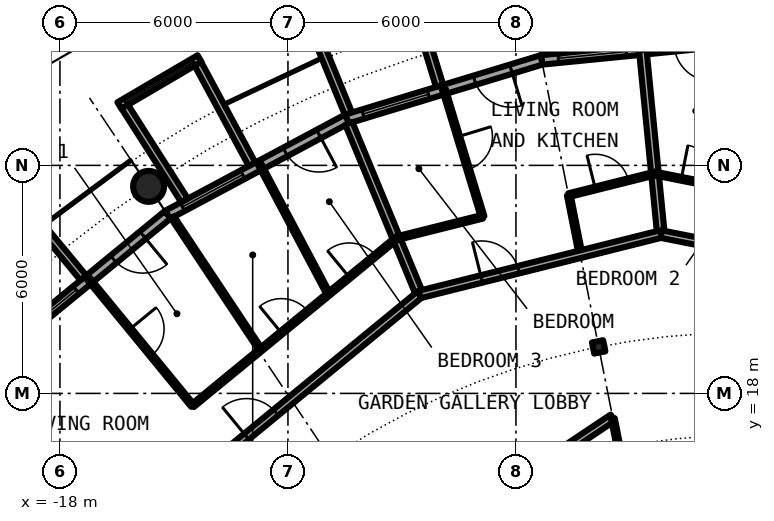
"""IFC4 building model, lengths in metres.
Left out: names, types, materials, properties, quantities, classifications, styles, units other than length and angle.
Written with IfcOpenShell. Run it as: python <this file> out.ifc"""

import sys

from ifc_helpers import new_model, si_unit, direction, frame, frame_2d, origin, origin_2d, place, context, subcontext, project, spatial, rectangle, circle, hollow_circle, i_section, extrude, element, fill, save


model = new_model("IFC4")
c1 = context("Model", 3, precision=1e-05, world=origin(), true_north=direction((0.0, 1.0)))
c2 = subcontext(c1, "Body", "Model", "MODEL_VIEW")
j1 = project(units=[si_unit("LENGTHUNIT", "METRE"), si_unit("PLANEANGLEUNIT", "RADIAN")], contexts=[c1])
p1 = place(None, origin())
s1 = spatial("IfcSite", under=j1, at=p1, CompositionType="ELEMENT")
p2 = place(p1, origin())
s2 = spatial("IfcBuilding", under=s1, at=p2, CompositionType="ELEMENT")
p3 = place(p2, frame((0.0, 0.0, 227.95)))
s3 = spatial("IfcBuildingStorey", under=s2, at=p3, CompositionType="ELEMENT", Elevation=227.95)
p4 = place(p3, frame((-15.667, 23.448, 0.0), z_axis=(0.0, 0.0, 1.0), x_axis=(1.0, 0.0, 0.0)))
e1 = element("IfcColumn", 1, at=p4, inside=s3, PredefinedType="COLUMN", context=c2, shape_type="SweptSolid", body=[
    extrude(hollow_circle(Radius=0.406, WallThickness=0.03, at=origin_2d()), origin(), (0.0, 0.0, 1.0), 3.05),
])
p5 = place(p3, frame((-3.824, 19.223, 0.0), z_axis=(0.0, 0.0, 1.0), x_axis=(-0.195090322016, 0.980785280403, 0.0)))
e2 = element("IfcColumn", 2, at=p5, inside=s3, PredefinedType="COLUMN", context=c2, shape_type="SweptSolid", body=[
    extrude(i_section(OverallWidth=0.3, OverallDepth=0.3, WebThickness=0.011, FlangeThickness=0.019, FilletRadius=0.027, at=origin_2d()), origin(), (0.0, 0.0, 1.0), 3.05),
])
p6 = place(p3, frame((0.0, 27.3, 0.0), z_axis=(0.0, 0.0, 1.0), x_axis=(-0.995173996315, -0.098126026407, 0.0)))
e3 = element("IfcWall", 3, at=p6, inside=s3, PredefinedType="SOLIDWALL", context=c2, shape_type="SweptSolid", body=[
    extrude(rectangle(XDim=5.352, YDim=0.25, at=frame_2d((2.676, 0.0))), origin(), (0.0, 0.0, 1.0), 2.7),
])
p7 = place(p6, frame((0.841, 0.0, 0.0)))
e4 = element("IfcOpeningElement", 4, at=p7, cuts=e3, PredefinedType="OPENING", context=c2, shape_type="SweptSolid", body=[
    extrude(rectangle(XDim=1.0, YDim=2.2, at=frame_2d((0.5, 1.1))), frame((0.0, 0.135, 0.0), z_axis=(0.0, -1.0, 0.0), x_axis=(1.0, 0.0, 0.0)), (0.0, 0.0, 1.0), 0.27),
])
p8 = place(p6, frame((3.111, 0.0, 0.3)))
e5 = element("IfcOpeningElement", 5, at=p8, cuts=e3, PredefinedType="OPENING", context=c2, shape_type="SweptSolid", body=[
    extrude(rectangle(XDim=1.8, YDim=2.1, at=frame_2d((0.9, 1.05))), frame((0.0, 0.135, 0.0), z_axis=(0.0, -1.0, 0.0), x_axis=(1.0, 0.0, 0.0)), (0.0, 0.0, 1.0), 0.27),
])
p9 = place(p3, frame((-4.769, 26.956, -0.03), z_axis=(0.0, 0.0, 1.0), x_axis=(-0.174056778901, 0.984735618183, 0.0)))
e6 = element("IfcWall", 6, at=p9, inside=s3, PredefinedType="SOLIDWALL", context=c2, shape_type="SweptSolid", body=[
    extrude(rectangle(XDim=2.925, YDim=0.2, at=frame_2d((1.462, 0.0))), origin(), (0.0, 0.0, 1.0), 2.73),
])
p10 = place(p3, frame((-5.326, 26.775, 0.0), z_axis=(0.0, 0.0, 1.0), x_axis=(-0.956965678721, -0.290201119486, 0.0)))
e7 = element("IfcWall", 7, at=p10, inside=s3, PredefinedType="SOLIDWALL", context=c2, shape_type="SweptSolid", body=[
    extrude(rectangle(XDim=5.351, YDim=0.25, at=frame_2d((2.676, 0.0))), origin(), (0.0, 0.0, 1.0), 2.7),
])
p11 = place(p10, frame((0.841, 0.0, 0.0)))
e8 = element("IfcOpeningElement", 8, at=p11, cuts=e7, PredefinedType="OPENING", context=c2, shape_type="SweptSolid", body=[
    extrude(rectangle(XDim=1.0, YDim=2.2, at=frame_2d((0.5, 1.1))), frame((0.0, 0.135, 0.0), z_axis=(0.0, -1.0, 0.0), x_axis=(1.0, 0.0, 0.0)), (0.0, 0.0, 1.0), 0.27),
])
p12 = place(p10, frame((3.111, 0.0, 0.3)))
e9 = element("IfcOpeningElement", 9, at=p12, cuts=e7, PredefinedType="OPENING", context=c2, shape_type="SweptSolid", body=[
    extrude(rectangle(XDim=1.8, YDim=2.1, at=frame_2d((0.9, 1.05))), frame((0.0, 0.135, 0.0), z_axis=(0.0, -1.0, 0.0), x_axis=(1.0, 0.0, 0.0)), (0.0, 0.0, 1.0), 0.27),
])
p13 = place(p3, frame((-8.009, 26.092, -0.03), z_axis=(0.0, 0.0, 1.0), x_axis=(-0.293406695073, 0.955987715029, 0.0)))
e10 = element("IfcWall", 10, at=p13, inside=s3, PredefinedType="SOLIDWALL", context=c2, shape_type="SweptSolid", body=[
    extrude(rectangle(XDim=3.006, YDim=0.2, at=frame_2d((1.503, 0.0))), origin(), (0.0, 0.0, 1.0), 2.73),
])
p14 = place(p3, frame((-10.409, 25.364, -0.03), z_axis=(0.0, 0.0, 1.0), x_axis=(-0.379509886562, 0.925187681501, 0.0)))
e11 = element("IfcWall", 11, at=p14, inside=s3, PredefinedType="SOLIDWALL", context=c2, shape_type="SweptSolid", body=[
    extrude(rectangle(XDim=2.883, YDim=0.2, at=frame_2d((1.441, 0.0))), origin(), (0.0, 0.0, 1.0), 2.73),
])
p15 = place(p3, frame((-10.447, 25.222, 0.0), z_axis=(0.0, 0.0, 1.0), x_axis=(-0.881915646801, -0.471407246368, 0.0)))
e12 = element("IfcWall", 12, at=p15, inside=s3, PredefinedType="SOLIDWALL", context=c2, shape_type="SweptSolid", body=[
    extrude(rectangle(XDim=5.352, YDim=0.25, at=frame_2d((2.676, 0.0))), origin(), (0.0, 0.0, 1.0), 2.7),
])
p16 = place(p15, frame((0.841, 0.0, 0.0)))
e13 = element("IfcOpeningElement", 13, at=p16, cuts=e12, PredefinedType="OPENING", context=c2, shape_type="SweptSolid", body=[
    extrude(rectangle(XDim=1.0, YDim=2.2, at=frame_2d((0.5, 1.1))), frame((0.0, 0.135, 0.0), z_axis=(0.0, -1.0, 0.0), x_axis=(1.0, 0.0, 0.0)), (0.0, 0.0, 1.0), 0.27),
])
p17 = place(p15, frame((3.111, 0.0, 0.3)))
e14 = element("IfcOpeningElement", 14, at=p17, cuts=e12, PredefinedType="OPENING", context=c2, shape_type="SweptSolid", body=[
    extrude(rectangle(XDim=1.8, YDim=2.1, at=frame_2d((0.9, 1.05))), frame((0.0, 0.135, 0.0), z_axis=(0.0, -1.0, 0.0), x_axis=(1.0, 0.0, 0.0)), (0.0, 0.0, 1.0), 0.27),
])
p18 = place(p3, frame((-14.327, 26.812, -0.03), z_axis=(0.0, 0.0, 1.0), x_axis=(-0.862403467503, -0.506221551535, 0.0)))
e15 = element("IfcWall", 15, at=p18, inside=s3, PredefinedType="SOLIDWALL", context=c2, shape_type="SweptSolid", body=[
    extrude(rectangle(XDim=2.446, YDim=0.2, at=frame_2d((1.223, 0.0))), origin(), (0.0, 0.0, 1.0), 2.73),
])
p19 = place(p18, frame((0.183, 0.0, 0.33)))
e16 = element("IfcOpeningElement", 16, at=p19, cuts=e15, PredefinedType="OPENING", context=c2, shape_type="SweptSolid", body=[
    extrude(circle(Radius=1.04, at=frame_2d((1.04, 1.04))), frame((0.0, 0.11, 0.0), z_axis=(0.0, -1.0, 0.0), x_axis=(1.0, 0.0, 0.0)), (0.0, 0.0, 1.0), 0.22),
])
p20 = place(p3, frame((-12.945, 24.029, -0.03), z_axis=(0.0, 0.0, 1.0), x_axis=(-0.474424310775, 0.88029629861, 0.0)))
e17 = element("IfcWall", 17, at=p20, inside=s3, PredefinedType="SOLIDWALL", context=c2, shape_type="SweptSolid", body=[
    extrude(rectangle(XDim=3.006, YDim=0.2, at=frame_2d((1.503, 0.0))), origin(), (0.0, 0.0, 1.0), 2.73),
])
p21 = place(p3, frame((-14.722, 23.079, -0.03), z_axis=(0.0, 0.0, 1.0), x_axis=(-0.537572179146, 0.843217737129, 0.0)))
e18 = element("IfcWall", 18, at=p21, inside=s3, PredefinedType="SOLIDWALL", context=c2, shape_type="SweptSolid", body=[
    extrude(rectangle(XDim=2.924, YDim=0.2, at=frame_2d((1.462, 0.0))), origin(), (0.0, 0.0, 1.0), 2.73),
])
p22 = place(p3, frame((-15.167, 22.699, 0.0), z_axis=(0.0, 0.0, 1.0), x_axis=(-0.773019449054, -0.634382322723, 0.0)))
e19 = element("IfcWall", 19, at=p22, inside=s3, PredefinedType="SOLIDWALL", context=c2, shape_type="SweptSolid", body=[
    extrude(rectangle(XDim=5.352, YDim=0.25, at=frame_2d((2.676, 0.0))), origin(), (0.0, 0.0, 1.0), 2.7),
])
p23 = place(p22, frame((0.841, 0.0, 0.0)))
e20 = element("IfcOpeningElement", 20, at=p23, cuts=e19, PredefinedType="OPENING", context=c2, shape_type="SweptSolid", body=[
    extrude(rectangle(XDim=1.0, YDim=2.2, at=frame_2d((0.5, 1.1))), frame((0.0, 0.135, 0.0), z_axis=(0.0, -1.0, 0.0), x_axis=(1.0, 0.0, 0.0)), (0.0, 0.0, 1.0), 0.27),
])
p24 = place(p22, frame((3.111, 0.0, 0.3)))
e21 = element("IfcOpeningElement", 21, at=p24, cuts=e19, PredefinedType="OPENING", context=c2, shape_type="SweptSolid", body=[
    extrude(rectangle(XDim=1.8, YDim=2.1, at=frame_2d((0.9, 1.05))), frame((0.0, 0.135, 0.0), z_axis=(0.0, -1.0, 0.0), x_axis=(1.0, 0.0, 0.0)), (0.0, 0.0, 1.0), 0.27),
])
p25 = place(p3, frame((-17.384, 21.041, -0.03), z_axis=(0.0, 0.0, 1.0), x_axis=(-0.63709551667, 0.770784861449, 0.0)))
e22 = element("IfcWall", 22, at=p25, inside=s3, PredefinedType="SOLIDWALL", context=c2, shape_type="SweptSolid", body=[
    extrude(rectangle(XDim=3.006, YDim=0.2, at=frame_2d((1.503, 0.0))), origin(), (0.0, 0.0, 1.0), 2.73),
])
p26 = place(p3, frame((-4.61, 23.217, 0.0), z_axis=(0.0, 0.0, 1.0), x_axis=(0.194485862594, -0.980905321247, 0.0)))
e23 = element("IfcWall", 23, at=p26, inside=s3, PredefinedType="PARTITIONING", context=c2, shape_type="SweptSolid", body=[
    extrude(rectangle(XDim=1.584, YDim=0.1, at=frame_2d((0.792, 0.0))), origin(), (0.0, 0.0, 1.0), 2.7),
])
p27 = place(p3, frame((-17.24, 21.007, 0.0), z_axis=(0.0, 0.0, 1.0), x_axis=(0.634342681687, -0.77305197897, 0.0)))
e24 = element("IfcWall", 24, at=p27, inside=s3, PredefinedType="PARTITIONING", context=c2, shape_type="SweptSolid", body=[
    extrude(rectangle(XDim=4.305, YDim=0.1, at=frame_2d((2.153, 0.0))), origin(), (0.0, 0.0, 1.0), 2.7),
])
p28 = place(p27, frame((1.703, 0.0, 0.0)))
e25 = element("IfcOpeningElement", 25, at=p28, cuts=e24, PredefinedType="OPENING", context=c2, shape_type="SweptSolid", body=[
    extrude(rectangle(XDim=0.9, YDim=2.3, at=frame_2d((0.45, 1.15))), frame((0.0, 0.06, 0.0), z_axis=(0.0, -1.0, 0.0), x_axis=(1.0, 0.0, 0.0)), (0.0, 0.0, 1.0), 0.12),
])
p29 = place(p3, frame((-12.734, 24.007, 0.0), z_axis=(0.0, 0.0, 1.0), x_axis=(0.468594334564, -0.883413464701, 0.0)))
e26 = element("IfcWall", 26, at=p29, inside=s3, PredefinedType="PARTITIONING", context=c2, shape_type="SweptSolid", body=[
    extrude(rectangle(XDim=3.841, YDim=0.1, at=frame_2d((1.92, 0.0))), origin(), (0.0, 0.0, 1.0), 2.7),
])
p30 = place(p3, frame((-10.399, 25.106, 0.0), z_axis=(0.0, 0.0, 1.0), x_axis=(0.382651153718, -0.923892902104, 0.0)))
e27 = element("IfcWall", 27, at=p30, inside=s3, PredefinedType="PARTITIONING", context=c2, shape_type="SweptSolid", body=[
    extrude(rectangle(XDim=4.874, YDim=0.2, at=frame_2d((2.437, 0.0))), origin(), (0.0, 0.0, 1.0), 2.7),
])
p31 = place(p3, frame((-7.897, 26.002, 0.0), z_axis=(0.0, 0.0, 1.0), x_axis=(0.290784578865, -0.956788549625, 0.0)))
e28 = element("IfcWall", 28, at=p31, inside=s3, PredefinedType="PARTITIONING", context=c2, shape_type="SweptSolid", body=[
    extrude(rectangle(XDim=3.504, YDim=0.1, at=frame_2d((1.752, 0.0))), origin(), (0.0, 0.0, 1.0), 2.7),
])
p32 = place(p31, frame((1.302, 0.0, 0.0)))
e29 = element("IfcOpeningElement", 29, at=p32, cuts=e28, PredefinedType="OPENING", context=c2, shape_type="SweptSolid", body=[
    extrude(rectangle(XDim=0.9, YDim=2.3, at=frame_2d((0.45, 1.15))), frame((0.0, 0.06, 0.0), z_axis=(0.0, -1.0, 0.0), x_axis=(1.0, 0.0, 0.0)), (0.0, 0.0, 1.0), 0.12),
])
p33 = place(p3, frame((-2.664, 27.044, 0.0), z_axis=(0.0, 0.0, 1.0), x_axis=(0.098070432075, -0.995179476453, 0.0)))
e30 = element("IfcWall", 30, at=p33, inside=s3, PredefinedType="PARTITIONING", context=c2, shape_type="SweptSolid", body=[
    extrude(rectangle(XDim=4.874, YDim=0.2, at=frame_2d((2.437, 0.0))), origin(), (0.0, 0.0, 1.0), 2.7),
])
p34 = place(p3, frame((-15.039, 22.634, 0.0), z_axis=(0.0, 0.0, 1.0), x_axis=(0.553609857728, -0.832776155654, 0.0)))
e31 = element("IfcWall", 31, at=p34, inside=s3, PredefinedType="PARTITIONING", context=c2, shape_type="SweptSolid", body=[
    extrude(rectangle(XDim=4.187, YDim=0.1, at=frame_2d((2.094, 0.0))), origin(), (0.0, 0.0, 1.0), 2.7),
])
p35 = place(p3, frame((-14.718, 9.832, 0.0), z_axis=(0.0, 0.0, 1.0), x_axis=(0.831437137577, 0.555618831806, 0.0)))
e32 = element("IfcWall", 32, at=p35, inside=s3, PredefinedType="PARTITIONING", context=c2, shape_type="SweptSolid", body=[
    extrude(rectangle(XDim=13.549, YDim=0.2, at=frame_2d((6.774, 0.0))), origin(), (0.0, 0.0, 1.0), 2.7),
])
p36 = place(p35, frame((7.968, 0.0, 0.0)))
e33 = element("IfcOpeningElement", 33, at=p36, cuts=e32, PredefinedType="OPENING", context=c2, shape_type="SweptSolid", body=[
    extrude(rectangle(XDim=1.0, YDim=2.3, at=frame_2d((0.5, 1.15))), frame((0.0, 0.11, 0.0), z_axis=(0.0, -1.0, 0.0), x_axis=(1.0, 0.0, 0.0)), (0.0, 0.0, 1.0), 0.22),
])
p37 = place(p3, frame((-18.542, 12.389, 0.0), z_axis=(0.0, 0.0, 1.0), x_axis=(0.772983503654, 0.634426121056, 0.0)))
e34 = element("IfcWall", 34, at=p37, inside=s3, PredefinedType="PARTITIONING", context=c2, shape_type="SweptSolid", body=[
    extrude(rectangle(XDim=12.947, YDim=0.2, at=frame_2d((6.474, 0.0))), origin(), (0.0, 0.0, 1.0), 2.7),
])
p38 = place(p37, frame((7.053, 0.0, 0.0)))
e35 = element("IfcOpeningElement", 35, at=p38, cuts=e34, PredefinedType="OPENING", context=c2, shape_type="SweptSolid", body=[
    extrude(rectangle(XDim=1.0, YDim=2.3, at=frame_2d((0.5, 1.15))), frame((0.0, 0.11, 0.0), z_axis=(0.0, -1.0, 0.0), x_axis=(1.0, 0.0, 0.0)), (0.0, 0.0, 1.0), 0.22),
])
p39 = place(p3, frame((-2.186, 22.193, 0.0), z_axis=(0.0, 0.0, 1.0), x_axis=(0.980780341017, -0.195115152343, 0.0)))
e36 = element("IfcWall", 36, at=p39, inside=s3, PredefinedType="PARTITIONING", context=c2, shape_type="SweptSolid", body=[
    extrude(rectangle(XDim=12.947, YDim=0.2, at=frame_2d((6.473, 0.0))), origin(), (0.0, 0.0, 1.0), 2.7),
])
p40 = place(p39, frame((4.895, 0.0, 0.0)))
e37 = element("IfcOpeningElement", 37, at=p40, cuts=e36, PredefinedType="OPENING", context=c2, shape_type="SweptSolid", body=[
    extrude(rectangle(XDim=1.0, YDim=2.3, at=frame_2d((0.5, 1.15))), frame((0.0, 0.11, 0.0), z_axis=(0.0, -1.0, 0.0), x_axis=(1.0, 0.0, 0.0)), (0.0, 0.0, 1.0), 0.22),
])
p41 = place(p3, frame((-8.534, 20.603, 0.0), z_axis=(0.0, 0.0, 1.0), x_axis=(0.97003047456, 0.242983288366, 0.0)))
e38 = element("IfcWall", 38, at=p41, inside=s3, PredefinedType="PARTITIONING", context=c2, shape_type="SweptSolid", body=[
    extrude(rectangle(XDim=6.544, YDim=0.2, at=frame_2d((3.272, 0.0))), origin(), (0.0, 0.0, 1.0), 2.7),
])
p42 = place(p41, frame((1.681, 0.0, 0.0)))
e39 = element("IfcOpeningElement", 39, at=p42, cuts=e38, PredefinedType="OPENING", context=c2, shape_type="SweptSolid", body=[
    extrude(rectangle(XDim=1.0, YDim=2.3, at=frame_2d((0.5, 1.15))), frame((0.0, 0.11, 0.0), z_axis=(0.0, -1.0, 0.0), x_axis=(1.0, 0.0, 0.0)), (0.0, 0.0, 1.0), 0.22),
])
p43 = place(p3, frame((-14.505, 17.681, 0.0), z_axis=(0.0, 0.0, 1.0), x_axis=(0.773067618794, 0.634323621484, 0.0)))
e40 = element("IfcWall", 40, at=p43, inside=s3, PredefinedType="PARTITIONING", context=c2, shape_type="SweptSolid", body=[
    extrude(rectangle(XDim=6.938, YDim=0.1, at=frame_2d((3.469, 0.0))), origin(), (0.0, 0.0, 1.0), 2.7),
])
p44 = place(p43, frame((3.016, 0.0, 0.0)))
e41 = element("IfcOpeningElement", 41, at=p44, cuts=e40, PredefinedType="OPENING", context=c2, shape_type="SweptSolid", body=[
    extrude(rectangle(XDim=0.9, YDim=2.3, at=frame_2d((0.45, 1.15))), frame((0.0, 0.06, 0.0), z_axis=(0.0, -1.0, 0.0), x_axis=(1.0, 0.0, 0.0)), (0.0, 0.0, 1.0), 0.12),
])
p45 = place(p43, frame((5.325, 0.0, 0.0)))
e42 = element("IfcOpeningElement", 42, at=p45, cuts=e40, PredefinedType="OPENING", context=c2, shape_type="SweptSolid", body=[
    extrude(rectangle(XDim=0.9, YDim=2.3, at=frame_2d((0.45, 1.15))), frame((0.0, 0.06, 0.0), z_axis=(0.0, -1.0, 0.0), x_axis=(1.0, 0.0, 0.0)), (0.0, 0.0, 1.0), 0.12),
])
p46 = place(p3, frame((-2.346, 23.785, 0.0), z_axis=(0.0, 0.0, 1.0), x_axis=(0.98080065826, -0.195012996379, 0.0)))
e43 = element("IfcWall", 43, at=p46, inside=s3, PredefinedType="PARTITIONING", context=c2, shape_type="SweptSolid", body=[
    extrude(rectangle(XDim=6.938, YDim=0.1, at=frame_2d((3.469, 0.0))), origin(), (0.0, 0.0, 1.0), 2.7),
])
p47 = place(p46, frame((3.024, 0.0, 0.0)))
e44 = element("IfcOpeningElement", 44, at=p47, cuts=e43, PredefinedType="OPENING", context=c2, shape_type="SweptSolid", body=[
    extrude(rectangle(XDim=0.9, YDim=2.3, at=frame_2d((0.45, 1.15))), frame((0.0, 0.06, 0.0), z_axis=(0.0, -1.0, 0.0), x_axis=(1.0, 0.0, 0.0)), (0.0, 0.0, 1.0), 0.12),
])
p48 = place(p46, frame((0.71, 0.0, 0.0)))
e45 = element("IfcOpeningElement", 45, at=p48, cuts=e43, PredefinedType="OPENING", context=c2, shape_type="SweptSolid", body=[
    extrude(rectangle(XDim=0.9, YDim=2.3, at=frame_2d((0.45, 1.15))), frame((0.0, 0.06, 0.0), z_axis=(0.0, -1.0, 0.0), x_axis=(1.0, 0.0, 0.0)), (0.0, 0.0, 1.0), 0.12),
])
p49 = place(p3, frame((-9.148, 22.08, 0.0), z_axis=(0.0, 0.0, 1.0), x_axis=(0.9700564467, 0.242879579658, 0.0)))
e46 = element("IfcWall", 46, at=p49, inside=s3, PredefinedType="PARTITIONING", context=c2, shape_type="SweptSolid", body=[
    extrude(rectangle(XDim=2.338, YDim=0.1, at=frame_2d((1.169, 0.0))), origin(), (0.0, 0.0, 1.0), 2.7),
])
p50 = place(p3, frame((-4.61, 23.217, 0.0), z_axis=(0.0, 0.0, 1.0), x_axis=(0.970031792706, 0.242978026043, 0.0)))
e47 = element("IfcWall", 47, at=p50, inside=s3, PredefinedType="PARTITIONING", context=c2, shape_type="SweptSolid", body=[
    extrude(rectangle(XDim=2.337, YDim=0.1, at=frame_2d((1.168, 0.0))), origin(), (0.0, 0.0, 1.0), 2.7),
])
p51 = place(p50, frame((0.719, 0.0, 0.0)))
e48 = element("IfcOpeningElement", 48, at=p51, cuts=e47, PredefinedType="OPENING", context=c2, shape_type="SweptSolid", body=[
    extrude(rectangle(XDim=0.9, YDim=2.3, at=frame_2d((0.45, 1.15))), frame((0.0, 0.06, 0.0), z_axis=(0.0, -1.0, 0.0), x_axis=(1.0, 0.0, 0.0)), (0.0, 0.0, 1.0), 0.12),
])
p52 = place(p3, frame((-3.449, 17.339, 0.0), z_axis=(0.0, 0.0, 1.0), x_axis=(0.195102838171, -0.980782790702, 0.0)))
e49 = element("IfcWall", 49, at=p52, inside=s3, PredefinedType="PARTITIONING", context=c2, shape_type="SweptSolid", body=[
    extrude(rectangle(XDim=4.448, YDim=0.1, at=frame_2d((2.224, 0.0))), origin(), (0.0, 0.0, 1.0), 2.7),
])
p53 = place(p8, origin())
e50 = element("IfcWindow", 50, at=p53, inside=s3, PartitioningType="SINGLE_PANEL", PredefinedType="WINDOW", context=c2, shape_type="SweptSolid", body=[
    extrude(rectangle(XDim=1.8, YDim=2.1, at=frame_2d((0.9, 1.05))), frame((0.0, 0.03, 0.0), z_axis=(0.0, -1.0, 0.0), x_axis=(1.0, 0.0, 0.0)), (0.0, 0.0, 1.0), 0.06),
])
fill(e5, e50)
p54 = place(p11, origin())
e51 = element("IfcDoor", 51, at=p54, inside=s3, OperationType="SINGLE_SWING_LEFT", PredefinedType="DOOR", context=c2, shape_type="SweptSolid", body=[
    extrude(rectangle(XDim=1.0, YDim=2.2, at=frame_2d((0.5, 1.1))), frame((0.0, 0.025, 0.0), z_axis=(0.0, -1.0, 0.0), x_axis=(1.0, 0.0, 0.0)), (0.0, 0.0, 1.0), 0.05),
])
fill(e8, e51)
p55 = place(p12, origin())
e52 = element("IfcWindow", 52, at=p55, inside=s3, PartitioningType="SINGLE_PANEL", PredefinedType="WINDOW", context=c2, shape_type="SweptSolid", body=[
    extrude(rectangle(XDim=1.8, YDim=2.1, at=frame_2d((0.9, 1.05))), frame((0.0, 0.03, 0.0), z_axis=(0.0, -1.0, 0.0), x_axis=(1.0, 0.0, 0.0)), (0.0, 0.0, 1.0), 0.06),
])
fill(e9, e52)
p56 = place(p16, origin())
e53 = element("IfcDoor", 53, at=p56, inside=s3, OperationType="SINGLE_SWING_LEFT", PredefinedType="DOOR", context=c2, shape_type="SweptSolid", body=[
    extrude(rectangle(XDim=1.0, YDim=2.2, at=frame_2d((0.5, 1.1))), frame((0.0, 0.025, 0.0), z_axis=(0.0, -1.0, 0.0), x_axis=(1.0, 0.0, 0.0)), (0.0, 0.0, 1.0), 0.05),
])
fill(e13, e53)
p57 = place(p17, origin())
e54 = element("IfcWindow", 54, at=p57, inside=s3, PartitioningType="SINGLE_PANEL", PredefinedType="WINDOW", context=c2, shape_type="SweptSolid", body=[
    extrude(rectangle(XDim=1.8, YDim=2.1, at=frame_2d((0.9, 1.05))), frame((0.0, 0.03, 0.0), z_axis=(0.0, -1.0, 0.0), x_axis=(1.0, 0.0, 0.0)), (0.0, 0.0, 1.0), 0.06),
])
fill(e14, e54)
p58 = place(p19, origin())
e55 = element("IfcWindow", 55, at=p58, inside=s3, PartitioningType="SINGLE_PANEL", PredefinedType="WINDOW", context=c2, shape_type="SweptSolid", body=[
    extrude(circle(Radius=1.04, at=frame_2d((1.04, 1.04))), frame((0.0, 0.03, 0.0), z_axis=(0.0, -1.0, 0.0), x_axis=(1.0, 0.0, 0.0)), (0.0, 0.0, 1.0), 0.06),
])
fill(e16, e55)
p59 = place(p23, origin())
e56 = element("IfcDoor", 56, at=p59, inside=s3, OperationType="SINGLE_SWING_LEFT", PredefinedType="DOOR", context=c2, shape_type="SweptSolid", body=[
    extrude(rectangle(XDim=1.0, YDim=2.2, at=frame_2d((0.5, 1.1))), frame((0.0, 0.025, 0.0), z_axis=(0.0, -1.0, 0.0), x_axis=(1.0, 0.0, 0.0)), (0.0, 0.0, 1.0), 0.05),
])
fill(e20, e56)
p60 = place(p24, origin())
e57 = element("IfcWindow", 57, at=p60, inside=s3, PartitioningType="SINGLE_PANEL", PredefinedType="WINDOW", context=c2, shape_type="SweptSolid", body=[
    extrude(rectangle(XDim=1.8, YDim=2.1, at=frame_2d((0.9, 1.05))), frame((0.0, 0.03, 0.0), z_axis=(0.0, -1.0, 0.0), x_axis=(1.0, 0.0, 0.0)), (0.0, 0.0, 1.0), 0.06),
])
fill(e21, e57)
p61 = place(p48, origin())
e58 = element("IfcDoor", 58, at=p61, inside=s3, OperationType="SINGLE_SWING_LEFT", PredefinedType="DOOR", context=c2, shape_type="SweptSolid", body=[
    extrude(rectangle(XDim=0.9, YDim=2.3, at=frame_2d((0.45, 1.15))), frame((0.0, 0.025, 0.0), z_axis=(0.0, -1.0, 0.0), x_axis=(1.0, 0.0, 0.0)), (0.0, 0.0, 1.0), 0.05),
])
fill(e45, e58)
p62 = place(p42, origin())
e59 = element("IfcDoor", 59, at=p62, inside=s3, OperationType="SINGLE_SWING_LEFT", PredefinedType="DOOR", context=c2, shape_type="SweptSolid", body=[
    extrude(rectangle(XDim=1.0, YDim=2.3, at=frame_2d((0.5, 1.15))), frame((0.0, 0.025, 0.0), z_axis=(0.0, -1.0, 0.0), x_axis=(1.0, 0.0, 0.0)), (0.0, 0.0, 1.0), 0.05),
])
fill(e39, e59)
p63 = place(p51, origin())
e60 = element("IfcDoor", 60, at=p63, inside=s3, OperationType="SINGLE_SWING_LEFT", PredefinedType="DOOR", context=c2, shape_type="SweptSolid", body=[
    extrude(rectangle(XDim=0.9, YDim=2.3, at=frame_2d((0.45, 1.15))), frame((0.0, 0.025, 0.0), z_axis=(0.0, -1.0, 0.0), x_axis=(1.0, 0.0, 0.0)), (0.0, 0.0, 1.0), 0.05),
])
fill(e48, e60)
p64 = place(p32, origin())
e61 = element("IfcDoor", 61, at=p64, inside=s3, OperationType="SINGLE_SWING_RIGHT", PredefinedType="DOOR", context=c2, shape_type="SweptSolid", body=[
    extrude(rectangle(XDim=0.9, YDim=2.3, at=frame_2d((0.45, 1.15))), frame((0.0, 0.025, 0.0), z_axis=(0.0, -1.0, 0.0), x_axis=(1.0, 0.0, 0.0)), (0.0, 0.0, 1.0), 0.05),
])
fill(e29, e61)
p65 = place(p38, origin())
e62 = element("IfcDoor", 62, at=p65, inside=s3, OperationType="SINGLE_SWING_RIGHT", PredefinedType="DOOR", context=c2, shape_type="SweptSolid", body=[
    extrude(rectangle(XDim=1.0, YDim=2.3, at=frame_2d((0.5, 1.15))), frame((0.0, 0.025, 0.0), z_axis=(0.0, -1.0, 0.0), x_axis=(1.0, 0.0, 0.0)), (0.0, 0.0, 1.0), 0.05),
])
fill(e35, e62)
p66 = place(p28, origin())
e63 = element("IfcDoor", 63, at=p66, inside=s3, OperationType="SINGLE_SWING_LEFT", PredefinedType="DOOR", context=c2, shape_type="SweptSolid", body=[
    extrude(rectangle(XDim=0.9, YDim=2.3, at=frame_2d((0.45, 1.15))), frame((0.0, 0.025, 0.0), z_axis=(0.0, -1.0, 0.0), x_axis=(1.0, 0.0, 0.0)), (0.0, 0.0, 1.0), 0.05),
])
fill(e25, e63)
p67 = place(p44, origin())
e64 = element("IfcDoor", 64, at=p67, inside=s3, OperationType="SINGLE_SWING_LEFT", PredefinedType="DOOR", context=c2, shape_type="SweptSolid", body=[
    extrude(rectangle(XDim=0.9, YDim=2.3, at=frame_2d((0.45, 1.15))), frame((0.0, 0.025, 0.0), z_axis=(0.0, -1.0, 0.0), x_axis=(1.0, 0.0, 0.0)), (0.0, 0.0, 1.0), 0.05),
])
fill(e41, e64)
p68 = place(p45, origin())
e65 = element("IfcDoor", 65, at=p68, inside=s3, OperationType="SINGLE_SWING_RIGHT", PredefinedType="DOOR", context=c2, shape_type="SweptSolid", body=[
    extrude(rectangle(XDim=0.9, YDim=2.3, at=frame_2d((0.45, 1.15))), frame((0.0, 0.025, 0.0), z_axis=(0.0, -1.0, 0.0), x_axis=(1.0, 0.0, 0.0)), (0.0, 0.0, 1.0), 0.05),
])
fill(e42, e65)
save(model, sys.argv[1])
